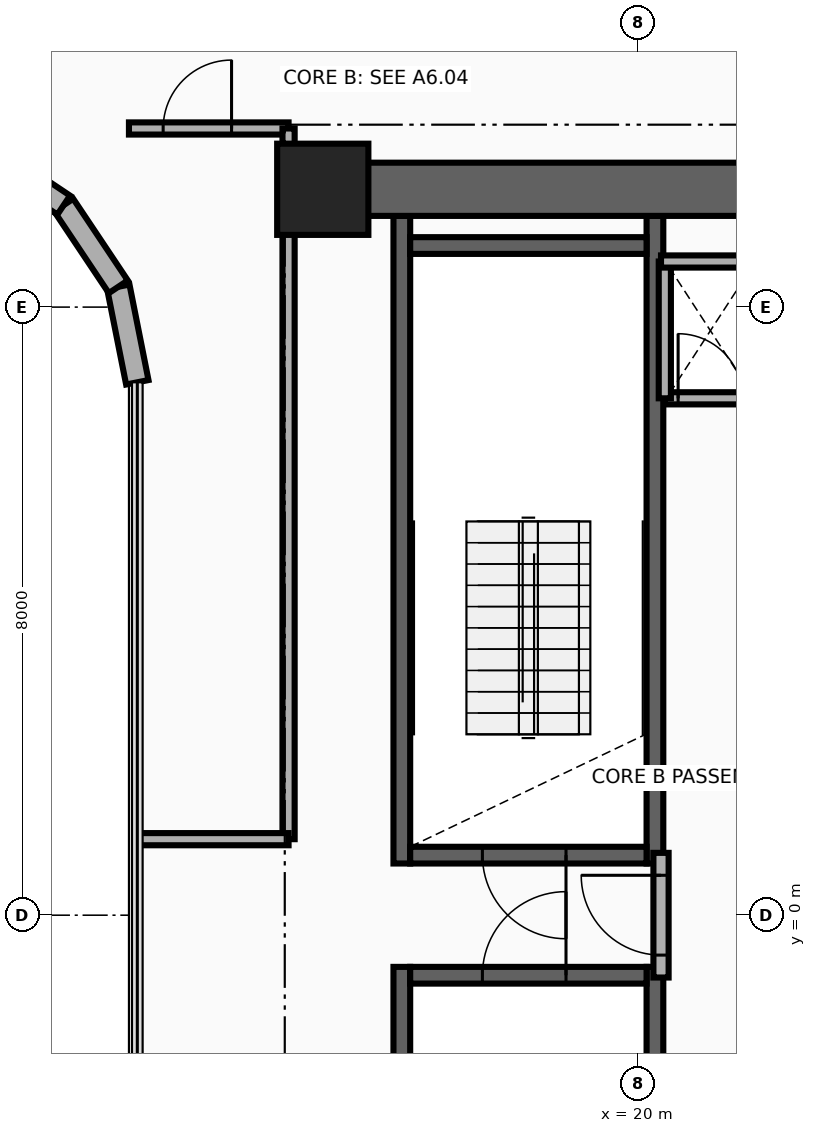
"""IFC4 building model, lengths in metres.
Left out: names, types, materials, properties, quantities, classifications, styles, units other than length and angle.
Written with IfcOpenShell. Run it as: python <this file> out.ifc"""

import sys

from ifc_helpers import new_model, si_unit, direction, frame, frame_2d, origin, origin_2d, place, context, subcontext, project, spatial, rectangle, extrude, source, transform, mapped, element, fill, save


model = new_model("IFC4")
c1 = context("Model", 3, precision=1e-05, world=origin(), true_north=direction((0.0, 1.0)))
c2 = subcontext(c1, "Body", "Model", "MODEL_VIEW")
j1 = project(units=[si_unit("LENGTHUNIT", "METRE"), si_unit("PLANEANGLEUNIT", "RADIAN")], contexts=[c1])
p1 = place(None, origin())
s1 = spatial("IfcSite", under=j1, at=p1, CompositionType="ELEMENT")
p2 = place(p1, origin())
s2 = spatial("IfcBuilding", under=s1, at=p2, CompositionType="ELEMENT")
p3 = place(p2, frame((0.0, 0.0, 105.7)))
s3 = spatial("IfcBuildingStorey", under=s2, at=p3, CompositionType="ELEMENT", Elevation=105.7)
for number, where, z_axis, x_axis in (
    (1, (16.89, 0.68, 0.0), (0.0, 0.0, 1.0), (0.0, 1.0, 0.0)),
    (2, (20.22, 0.68, 0.0), (0.0, 0.0, 1.0), (0.0, 1.0, 0.0)),
):
    element("IfcWall", number, at=place(p3, frame(where, z_axis=z_axis, x_axis=x_axis)), inside=s3, PredefinedType="SHEAR", context=c2, shape_type="SweptSolid", body=[
        extrude(rectangle(XDim=8.52, YDim=0.22, at=frame_2d((4.26, 0.0))), origin(), (0.0, 0.0, 1.0), 3.46),
    ])
p4 = place(p3, frame((17.0, 0.79, 0.0), z_axis=(0.0, 0.0, 1.0), x_axis=(1.0, 0.0, 0.0)))
e3 = element("IfcWall", 3, at=p4, inside=s3, PredefinedType="SHEAR", context=c2, shape_type="SweptSolid", body=[
    extrude(rectangle(XDim=3.11, YDim=0.22, at=frame_2d((1.555, 0.0))), origin(), (0.0, 0.0, 1.0), 3.46),
])
p5 = place(p4, frame((0.95, 0.0, 0.0)))
e4 = element("IfcOpeningElement", 4, at=p5, cuts=e3, PredefinedType="OPENING", context=c2, shape_type="SweptSolid", body=[
    extrude(rectangle(XDim=1.1, YDim=2.15, at=frame_2d((0.55, 1.075))), frame((0.0, 0.125, 0.0), z_axis=(0.0, -1.0, 0.0), x_axis=(1.0, 0.0, 0.0)), (0.0, 0.0, 1.0), 0.25),
])
p6 = place(p3, frame((17.0, 8.81, 0.0), z_axis=(0.0, 0.0, 1.0), x_axis=(1.0, 0.0, 0.0)))
e5 = element("IfcWall", 5, at=p6, inside=s3, PredefinedType="SHEAR", context=c2, shape_type="SweptSolid", body=[
    extrude(rectangle(XDim=3.11, YDim=0.22, at=frame_2d((1.555, 0.0))), origin(), (0.0, 0.0, 1.0), 3.46),
])
for number, where, z_axis, x_axis in (
    (6, (16.89, -9.2, 0.0), (0.0, 0.0, 1.0), (0.0, 1.0, 0.0)),
    (7, (20.22, -9.2, 0.0), (0.0, 0.0, 1.0), (0.0, 1.0, 0.0)),
):
    element("IfcWall", number, at=place(p3, frame(where, z_axis=z_axis, x_axis=x_axis)), inside=s3, PredefinedType="SHEAR", context=c2, shape_type="SweptSolid", body=[
        extrude(rectangle(XDim=8.52, YDim=0.22, at=frame_2d((4.26, 0.0))), origin(), (0.0, 0.0, 1.0), 3.46),
    ])
p7 = place(p3, frame((17.0, -0.79, 0.0), z_axis=(0.0, 0.0, 1.0), x_axis=(1.0, 0.0, 0.0)))
e8 = element("IfcWall", 8, at=p7, inside=s3, PredefinedType="SHEAR", context=c2, shape_type="SweptSolid", body=[
    extrude(rectangle(XDim=3.11, YDim=0.22, at=frame_2d((1.555, 0.0))), origin(), (0.0, 0.0, 1.0), 3.46),
])
p8 = place(p7, frame((0.95, 0.0, 0.0)))
e9 = element("IfcOpeningElement", 9, at=p8, cuts=e8, PredefinedType="OPENING", context=c2, shape_type="SweptSolid", body=[
    extrude(rectangle(XDim=1.1, YDim=2.15, at=frame_2d((0.55, 1.075))), frame((0.0, 0.125, 0.0), z_axis=(0.0, -1.0, 0.0), x_axis=(1.0, 0.0, 0.0)), (0.0, 0.0, 1.0), 0.25),
])
p9 = place(p3, frame((15.85, 9.55, 0.0), z_axis=(0.0, 0.0, 1.0), x_axis=(1.0, 0.0, 0.0)))
e10 = element("IfcWall", 10, at=p9, inside=s3, PredefinedType="SHEAR", context=c2, shape_type="SweptSolid", body=[
    extrude(rectangle(XDim=9.0, YDim=0.7, at=frame_2d((4.5, 0.0))), origin(), (0.0, 0.0, 1.0), 3.46),
])
m1 = source(origin(), c2, "Body", "SweptSolid", [
    extrude(rectangle(XDim=1.2, YDim=1.2, at=origin_2d()), origin(), (0.0, 0.0, 1.0), 3.7),
])
p10 = place(p3, frame((15.85, 9.55, 0.0), z_axis=(0.0, 0.0, 1.0), x_axis=(1.0, 0.0, 0.0)))
e11 = element("IfcColumn", 11, at=p10, inside=s3, PredefinedType="COLUMN", context=c2, shape_type="MappedRepresentation", body=[
    mapped(m1, transform((0.0, 0.0, 0.0), x_axis=(1.0, 0.0, 0.0), y_axis=(0.0, 1.0, 0.0), z_axis=(0.0, 0.0, 1.0), scale=1.0)),
])
p11 = place(p3, frame((13.41, 7.011, 0.0), z_axis=(0.0, 0.0, 1.0), x_axis=(-0.195090163074, 0.980785312019, 0.0)))
e12 = element("IfcWall", 12, at=p11, inside=s3, PredefinedType="SOLIDWALL", context=c2, shape_type="SweptSolid", body=[
    extrude(rectangle(XDim=1.281, YDim=0.3, at=frame_2d((0.641, 0.0))), origin(), (0.0, 0.0, 1.0), 3.46),
])
for number, where, z_axis, x_axis in (
    (13, (13.16, 8.268, 0.0), (0.0, 0.0, 1.0), (-0.556, 0.831, 0.0)),
    (14, (12.442, 9.342, 0.0), (0.0, 0.0, 1.0), (-0.831, 0.556, 0.0)),
):
    element("IfcWall", number, at=place(p3, frame(where, z_axis=z_axis, x_axis=x_axis)), inside=s3, PredefinedType="SOLIDWALL", context=c2, shape_type="SweptSolid", body=[
        extrude(rectangle(XDim=1.292, YDim=0.3, at=frame_2d((0.646, 0.0))), origin(), (0.0, 0.0, 1.0), 3.46),
    ])
p12 = place(p3, frame((20.3, -0.82, 0.0), z_axis=(0.0, 0.0, 1.0), x_axis=(0.0, 1.0, 0.0)))
e15 = element("IfcWall", 15, at=p12, inside=s3, PredefinedType="PARTITIONING", context=c2, shape_type="SweptSolid", body=[
    extrude(rectangle(XDim=1.64, YDim=0.2, at=frame_2d((0.82, 0.0))), origin(), (0.0, 0.0, 1.0), 3.46),
])
p13 = place(p12, frame((0.295, 0.0, 0.0)))
e16 = element("IfcOpeningElement", 16, at=p13, cuts=e15, PredefinedType="OPENING", context=c2, shape_type="SweptSolid", body=[
    extrude(rectangle(XDim=1.05, YDim=2.15, at=frame_2d((0.525, 1.075))), frame((0.0, 0.115, 0.0), z_axis=(0.0, -1.0, 0.0), x_axis=(1.0, 0.0, 0.0)), (0.0, 0.0, 1.0), 0.23),
])
p14 = place(p3, frame((20.35, 6.8, 0.0), z_axis=(0.0, 0.0, 1.0), x_axis=(1.0, 0.0, 0.0)))
e17 = element("IfcWall", 17, at=p14, inside=s3, PredefinedType="PARTITIONING", context=c2, shape_type="SweptSolid", body=[
    extrude(rectangle(XDim=1.2, YDim=0.16, at=frame_2d((0.6, 0.0))), origin(), (0.0, 0.0, 1.0), 3.46),
])
p15 = place(p14, frame((0.175, 0.0, 0.0)))
e18 = element("IfcOpeningElement", 18, at=p15, cuts=e17, PredefinedType="OPENING", context=c2, shape_type="SweptSolid", body=[
    extrude(rectangle(XDim=0.85, YDim=2.05, at=frame_2d((0.425, 1.025))), frame((0.0, 0.095, 0.0), z_axis=(0.0, -1.0, 0.0), x_axis=(1.0, 0.0, 0.0)), (0.0, 0.0, 1.0), 0.19),
])
p16 = place(p3, frame((20.35, 6.8, 0.0), z_axis=(0.0, 0.0, 1.0), x_axis=(0.0, 1.0, 0.0)))
e19 = element("IfcWall", 19, at=p16, inside=s3, PredefinedType="PARTITIONING", context=c2, shape_type="SweptSolid", body=[
    extrude(rectangle(XDim=1.8, YDim=0.16, at=frame_2d((0.9, 0.0))), origin(), (0.0, 0.0, 1.0), 3.46),
])
p17 = place(p3, frame((20.3, 8.6, 0.0), z_axis=(0.0, 0.0, 1.0), x_axis=(1.0, 0.0, 0.0)))
e20 = element("IfcWall", 20, at=p17, inside=s3, PredefinedType="PARTITIONING", context=c2, shape_type="SweptSolid", body=[
    extrude(rectangle(XDim=1.82, YDim=0.16, at=frame_2d((0.91, 0.0))), origin(), (0.0, 0.0, 1.0), 3.46),
])
p18 = place(p3, frame((13.3, 10.35, 0.0), z_axis=(0.0, 0.0, 1.0), x_axis=(1.0, 0.0, 0.0)))
e21 = element("IfcWall", 21, at=p18, inside=s3, PredefinedType="PARTITIONING", context=c2, shape_type="SweptSolid", body=[
    extrude(rectangle(XDim=2.1, YDim=0.16, at=frame_2d((1.05, 0.0))), origin(), (0.0, 0.0, 1.0), 2.666),
])
p19 = place(p18, frame((0.45, 0.0, 0.0)))
e22 = element("IfcOpeningElement", 22, at=p19, cuts=e21, PredefinedType="OPENING", context=c2, shape_type="SweptSolid", body=[
    extrude(rectangle(XDim=0.9, YDim=2.1, at=frame_2d((0.45, 1.05))), frame((0.0, 0.095, 0.0), z_axis=(0.0, -1.0, 0.0), x_axis=(1.0, 0.0, 0.0)), (0.0, 0.0, 1.0), 0.19),
])
p20 = place(p3, frame((15.4, 1.0, 0.0), z_axis=(0.0, 0.0, 1.0), x_axis=(0.0, 1.0, 0.0)))
e23 = element("IfcWall", 23, at=p20, inside=s3, PredefinedType="PARTITIONING", context=c2, shape_type="SweptSolid", body=[
    extrude(rectangle(XDim=9.35, YDim=0.16, at=frame_2d((4.675, 0.0))), origin(), (0.0, 0.0, 1.0), 2.245),
])
p21 = place(p3, frame((13.41, 1.0, 0.0), z_axis=(0.0, 0.0, 1.0), x_axis=(1.0, 0.0, 0.0)))
e24 = element("IfcWall", 24, at=p21, inside=s3, PredefinedType="PARTITIONING", context=c2, shape_type="SweptSolid", body=[
    extrude(rectangle(XDim=1.99, YDim=0.16, at=frame_2d((0.995, 0.0))), origin(), (0.0, 0.0, 1.0), 2.245),
])
p22 = place(p13, origin())
e25 = element("IfcDoor", 25, at=p22, inside=s3, OperationType="SINGLE_SWING_RIGHT", PredefinedType="DOOR", context=c2, shape_type="SweptSolid", body=[
    extrude(rectangle(XDim=1.05, YDim=2.15, at=frame_2d((0.525, 1.075))), frame((0.0, 0.025, 0.0), z_axis=(0.0, -1.0, 0.0), x_axis=(1.0, 0.0, 0.0)), (0.0, 0.0, 1.0), 0.05),
])
fill(e16, e25)
p23 = place(p5, frame((1.1, 0.0, 0.0), z_axis=(0.0, 0.0, 1.0), x_axis=(-1.0, 0.0, 0.0)))
e26 = element("IfcDoor", 26, at=p23, inside=s3, OperationType="SINGLE_SWING_LEFT", PredefinedType="DOOR", context=c2, shape_type="SweptSolid", body=[
    extrude(rectangle(XDim=1.1, YDim=2.15, at=frame_2d((0.55, 1.075))), frame((0.0, 0.025, 0.0), z_axis=(0.0, -1.0, 0.0), x_axis=(1.0, 0.0, 0.0)), (0.0, 0.0, 1.0), 0.05),
])
fill(e4, e26)
p24 = place(p8, origin())
e27 = element("IfcDoor", 27, at=p24, inside=s3, OperationType="SINGLE_SWING_RIGHT", PredefinedType="DOOR", context=c2, shape_type="SweptSolid", body=[
    extrude(rectangle(XDim=1.1, YDim=2.15, at=frame_2d((0.55, 1.075))), frame((0.0, 0.025, 0.0), z_axis=(0.0, -1.0, 0.0), x_axis=(1.0, 0.0, 0.0)), (0.0, 0.0, 1.0), 0.05),
])
fill(e9, e27)
p25 = place(p15, origin())
e28 = element("IfcDoor", 28, at=p25, inside=s3, OperationType="SINGLE_SWING_LEFT", PredefinedType="DOOR", context=c2, shape_type="SweptSolid", body=[
    extrude(rectangle(XDim=0.85, YDim=2.05, at=frame_2d((0.425, 1.025))), frame((0.0, 0.025, 0.0), z_axis=(0.0, -1.0, 0.0), x_axis=(1.0, 0.0, 0.0)), (0.0, 0.0, 1.0), 0.05),
])
fill(e18, e28)
p26 = place(p19, origin())
e29 = element("IfcDoor", 29, at=p26, inside=s3, OperationType="SINGLE_SWING_RIGHT", PredefinedType="DOOR", context=c2, shape_type="SweptSolid", body=[
    extrude(rectangle(XDim=0.9, YDim=2.1, at=frame_2d((0.45, 1.05))), frame((0.0, 0.025, 0.0), z_axis=(0.0, -1.0, 0.0), x_axis=(1.0, 0.0, 0.0)), (0.0, 0.0, 1.0), 0.05),
])
fill(e22, e29)
save(model, sys.argv[1])
